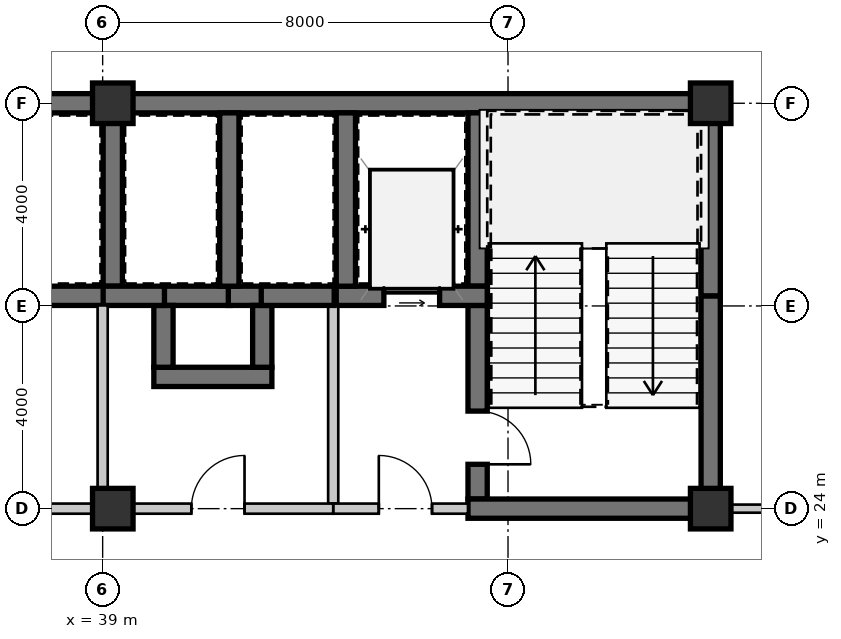
"""IFC4 building model, lengths in metres.
Left out: names, types, materials, properties, quantities, classifications, styles, units other than length and angle.
Written with IfcOpenShell. Run it as: python <this file> out.ifc"""

import sys

from ifc_helpers import new_model, si_unit, direction, frame, frame_2d, origin, origin_2d, place, context, subcontext, project, spatial, rectangle, extrude, source, transform, mapped, element, fill, save


model = new_model("IFC4")
c1 = context("Model", 3, precision=1e-05, world=origin(), true_north=direction((0.0, 1.0)))
c2 = subcontext(c1, "Body", "Model", "MODEL_VIEW")
j1 = project(units=[si_unit("LENGTHUNIT", "METRE"), si_unit("PLANEANGLEUNIT", "RADIAN")], contexts=[c1])
p1 = place(None, origin())
s1 = spatial("IfcSite", under=j1, at=p1, CompositionType="ELEMENT")
p2 = place(p1, origin())
s2 = spatial("IfcBuilding", under=s1, at=p2, CompositionType="ELEMENT")
p3 = place(p2, frame((0.0, 0.0, 19.95)))
s3 = spatial("IfcBuildingStorey", under=s2, at=p3, CompositionType="ELEMENT", Elevation=19.95)
m1 = source(origin(), c2, "Body", "SweptSolid", [
    extrude(rectangle(XDim=0.8, YDim=0.8, at=origin_2d()), origin(), (0.0, 0.0, 1.0), 3.15),
])
for number, where, z_axis, x_axis in (
    (1, (39.2, 24.0, 0.0), (0.0, 0.0, 1.0), (1.0, 0.0, 0.0)),
    (2, (51.0, 24.0, 0.0), (0.0, 0.0, 1.0), (1.0, 0.0, 0.0)),
    (3, (39.2, 32.0, 0.0), (0.0, 0.0, 1.0), (1.0, 0.0, 0.0)),
    (4, (51.0, 32.0, 0.0), (0.0, 0.0, 1.0), (1.0, 0.0, 0.0)),
):
    element("IfcColumn", number, at=place(p3, frame(where, z_axis=z_axis, x_axis=x_axis)), inside=s3, PredefinedType="COLUMN", context=c2, shape_type="MappedRepresentation", body=[
        mapped(m1, transform((0.0, 0.0, 0.0), scale=1.0)),
    ])
m2 = source(origin(), c2, "Body", "SweptSolid", [
    extrude(rectangle(XDim=11.2, YDim=0.38, at=frame_2d((5.6, 0.0))), origin(), (0.0, 0.0, 1.0), 2.93),
])
p4 = place(p3, frame((28.0, 32.0, 0.0), z_axis=(0.0, 0.0, 1.0), x_axis=(1.0, 0.0, 0.0)))
e5 = element("IfcWall", 5, at=p4, inside=s3, PredefinedType="SHEAR", context=c2, shape_type="MappedRepresentation", body=[
    mapped(m2, transform((0.0, 0.0, 0.0), scale=1.0)),
])
m3 = source(origin(), c2, "Body", "SweptSolid", [
    extrude(rectangle(XDim=11.99, YDim=0.38, at=frame_2d((5.995, 0.0))), origin(), (0.0, 0.0, 1.0), 2.93),
])
p5 = place(p3, frame((39.2, 32.0, 0.0), z_axis=(0.0, 0.0, 1.0), x_axis=(1.0, 0.0, 0.0)))
e6 = element("IfcWall", 6, at=p5, inside=s3, PredefinedType="SHEAR", context=c2, shape_type="MappedRepresentation", body=[
    mapped(m3, transform((0.0, 0.0, 0.0), scale=1.0)),
])
m4 = source(origin(), c2, "Body", "SweptSolid", [
    extrude(rectangle(XDim=4.01, YDim=0.38, at=frame_2d((2.005, 0.0))), origin(), (0.0, 0.0, 1.0), 2.93),
])
p6 = place(p3, frame((51.0, 24.19, 0.0), z_axis=(0.0, 0.0, 1.0), x_axis=(0.0, 1.0, 0.0)))
e7 = element("IfcWall", 7, at=p6, inside=s3, PredefinedType="SHEAR", context=c2, shape_type="MappedRepresentation", body=[
    mapped(m4, transform((0.0, 0.0, 0.0), scale=1.0)),
])
m5 = source(origin(), c2, "Body", "SweptSolid", [
    extrude(rectangle(XDim=3.61, YDim=0.38, at=frame_2d((1.805, 0.0))), origin(), (0.0, 0.0, 1.0), 2.93),
])
p7 = place(p3, frame((51.0, 28.2, 0.0), z_axis=(0.0, 0.0, 1.0), x_axis=(0.0, 1.0, 0.0)))
e8 = element("IfcWall", 8, at=p7, inside=s3, PredefinedType="SHEAR", context=c2, shape_type="MappedRepresentation", body=[
    mapped(m5, transform((0.0, 0.0, 0.0), scale=1.0)),
])
m6 = source(origin(), c2, "Body", "SweptSolid", [
    extrude(rectangle(XDim=3.42, YDim=0.38, at=frame_2d((1.71, 0.0))), origin(), (0.0, 0.0, 1.0), 2.93),
])
p8 = place(p3, frame((46.4, 31.81, 0.0), z_axis=(0.0, 0.0, 1.0), x_axis=(0.0, -1.0, 0.0)))
e9 = element("IfcWall", 9, at=p8, inside=s3, PredefinedType="SHEAR", context=c2, shape_type="MappedRepresentation", body=[
    mapped(m6, transform((0.0, 0.0, 0.0), scale=1.0)),
])
m7 = source(origin(), c2, "Body", "SweptSolid", [
    extrude(rectangle(XDim=3.82, YDim=0.38, at=frame_2d((1.91, 0.0))), origin(), (0.0, 0.0, 1.0), 2.93),
])
p9 = place(p3, frame((46.4, 28.01, 0.0), z_axis=(0.0, 0.0, 1.0), x_axis=(0.0, -1.0, 0.0)))
e10 = element("IfcWall", 10, at=p9, inside=s3, PredefinedType="SHEAR", context=c2, shape_type="MappedRepresentation", body=[
    mapped(m7, transform((0.0, 0.0, 0.0), scale=1.0)),
])
m8 = source(origin(), c2, "Body", "SweptSolid", [
    extrude(rectangle(XDim=1.05, YDim=2.1, at=frame_2d((0.525, 1.05))), frame((0.0, 0.2, 0.0), z_axis=(0.0, -1.0, 0.0), x_axis=(1.0, 0.0, 0.0)), (0.0, 0.0, 1.0), 0.4),
])
p10 = place(p9, frame((2.085, 0.0, 0.0)))
e11 = element("IfcOpeningElement", 11, at=p10, cuts=e10, PredefinedType="OPENING", context=c2, shape_type="MappedRepresentation", body=[
    mapped(m8, transform((0.0, 0.0, 0.0), scale=1.0)),
])
m9 = source(origin(), c2, "Body", "SweptSolid", [
    extrude(rectangle(XDim=4.98, YDim=0.38, at=frame_2d((2.49, 0.0))), origin(), (0.0, 0.0, 1.0), 2.93),
])
p11 = place(p3, frame((46.21, 24.0, 0.0), z_axis=(0.0, 0.0, 1.0), x_axis=(1.0, 0.0, 0.0)))
e12 = element("IfcWall", 12, at=p11, inside=s3, PredefinedType="SHEAR", context=c2, shape_type="MappedRepresentation", body=[
    mapped(m9, transform((0.0, 0.0, 0.0), scale=1.0)),
])
m10 = source(origin(), c2, "Body", "SweptSolid", [
    extrude(rectangle(XDim=2.98, YDim=0.38, at=frame_2d((1.49, 0.0))), origin(), (0.0, 0.0, 1.0), 2.93),
])
p12 = place(p3, frame((43.61, 28.2, 0.0), z_axis=(0.0, 0.0, 1.0), x_axis=(1.0, 0.0, 0.0)))
e13 = element("IfcWall", 13, at=p12, inside=s3, PredefinedType="SHEAR", context=c2, shape_type="MappedRepresentation", body=[
    mapped(m10, transform((0.0, 0.0, 0.0), scale=1.0)),
])
m11 = source(origin(), c2, "Body", "SweptSolid", [
    extrude(rectangle(XDim=1.1, YDim=2.15, at=frame_2d((0.55, 1.075))), frame((0.0, 0.2, 0.0), z_axis=(0.0, -1.0, 0.0), x_axis=(1.0, 0.0, 0.0)), (0.0, 0.0, 1.0), 0.4),
])
p13 = place(p12, frame((0.94, 0.0, 0.0)))
e14 = element("IfcOpeningElement", 14, at=p13, cuts=e13, PredefinedType="OPENING", context=c2, shape_type="MappedRepresentation", body=[
    mapped(m11, transform((0.0, 0.0, 0.0), scale=1.0)),
])
p14 = place(p3, frame((43.8, 31.81, 0.0), z_axis=(0.0, 0.0, 1.0), x_axis=(0.0, -1.0, 0.0)))
e15 = element("IfcWall", 15, at=p14, inside=s3, PredefinedType="SHEAR", context=c2, shape_type="MappedRepresentation", body=[
    mapped(m6, transform((0.0, 0.0, 0.0), scale=1.0)),
])
m12 = source(origin(), c2, "Body", "SweptSolid", [
    extrude(rectangle(XDim=3.91, YDim=0.2, at=frame_2d((1.955, 0.0))), origin(), (0.0, 0.0, 1.0), 2.93),
])
p15 = place(p3, frame((43.55, 28.01, 0.0), z_axis=(0.0, 0.0, 1.0), x_axis=(0.0, -1.0, 0.0)))
e16 = element("IfcWall", 16, at=p15, inside=s3, PredefinedType="SOLIDWALL", context=c2, shape_type="MappedRepresentation", body=[
    mapped(m12, transform((0.0, 0.0, 0.0), scale=1.0)),
])
m13 = source(origin(), c2, "Body", "SweptSolid", [
    extrude(rectangle(XDim=2.66, YDim=0.2, at=frame_2d((1.33, 0.0))), origin(), (0.0, 0.0, 1.0), 2.397),
])
p16 = place(p3, frame((43.55, 24.0, 0.0), z_axis=(0.0, 0.0, 1.0), x_axis=(1.0, 0.0, 0.0)))
e17 = element("IfcWall", 17, at=p16, inside=s3, PredefinedType="SOLIDWALL", context=c2, shape_type="MappedRepresentation", body=[
    mapped(m13, transform((0.0, 0.0, 0.0), scale=1.0)),
])
m14 = source(origin(), c2, "Body", "SweptSolid", [
    extrude(rectangle(XDim=1.05, YDim=2.1, at=frame_2d((0.525, 1.05))), frame((0.0, 0.11, 0.0), z_axis=(0.0, -1.0, 0.0), x_axis=(1.0, 0.0, 0.0)), (0.0, 0.0, 1.0), 0.22),
])
p17 = place(p16, frame((0.9, 0.0, 0.0)))
e18 = element("IfcOpeningElement", 18, at=p17, cuts=e17, PredefinedType="OPENING", context=c2, shape_type="MappedRepresentation", body=[
    mapped(m14, transform((0.0, 0.0, 0.0), scale=1.0)),
])
m15 = source(origin(), c2, "Body", "SweptSolid", [
    extrude(rectangle(XDim=1.32, YDim=0.38, at=frame_2d((0.66, 0.0))), origin(), (0.0, 0.0, 1.0), 2.93),
])
p18 = place(p3, frame((41.52, 28.2, 0.0), z_axis=(0.0, 0.0, 1.0), x_axis=(-1.0, 0.0, 0.0)))
e19 = element("IfcWall", 19, at=p18, inside=s3, PredefinedType="SHEAR", context=c2, shape_type="MappedRepresentation", body=[
    mapped(m15, transform((0.0, 0.0, 0.0), scale=1.0)),
])
m16 = source(origin(), c2, "Body", "SweptSolid", [
    extrude(rectangle(XDim=0.67, YDim=0.38, at=frame_2d((0.335, 0.0))), origin(), (0.0, 0.0, 1.0), 2.93),
])
p19 = place(p3, frame((42.15, 28.2, 0.0), z_axis=(0.0, 0.0, 1.0), x_axis=(-1.0, 0.0, 0.0)))
e20 = element("IfcWall", 20, at=p19, inside=s3, PredefinedType="SHEAR", context=c2, shape_type="MappedRepresentation", body=[
    mapped(m16, transform((0.0, 0.0, 0.0), scale=1.0)),
])
m17 = source(origin(), c2, "Body", "SweptSolid", [
    extrude(rectangle(XDim=2.33, YDim=0.38, at=frame_2d((1.165, 0.0))), origin(), (0.0, 0.0, 1.0), 2.93),
])
p20 = place(p3, frame((40.01, 26.6, 0.0), z_axis=(0.0, 0.0, 1.0), x_axis=(1.0, 0.0, 0.0)))
e21 = element("IfcWall", 21, at=p20, inside=s3, PredefinedType="SHEAR", context=c2, shape_type="MappedRepresentation", body=[
    mapped(m17, transform((0.0, 0.0, 0.0), scale=1.0)),
])
m18 = source(origin(), c2, "Body", "SweptSolid", [
    extrude(rectangle(XDim=1.22, YDim=0.38, at=frame_2d((0.61, 0.0))), origin(), (0.0, 0.0, 1.0), 2.93),
])
for number, where, z_axis, x_axis in (
    (22, (40.2, 28.01, 0.0), (0.0, 0.0, 1.0), (0.0, -1.0, 0.0)),
    (23, (42.15, 26.79, 0.0), (0.0, 0.0, 1.0), (0.0, 1.0, 0.0)),
):
    element("IfcWall", number, at=place(p3, frame(where, z_axis=z_axis, x_axis=x_axis)), inside=s3, PredefinedType="SHEAR", context=c2, shape_type="MappedRepresentation", body=[
        mapped(m18, transform((0.0, 0.0, 0.0), scale=1.0)),
    ])
p21 = place(p3, frame((39.2, 28.39, 0.0), z_axis=(0.0, 0.0, 1.0), x_axis=(0.0, 1.0, 0.0)))
e24 = element("IfcWall", 24, at=p21, inside=s3, PredefinedType="SHEAR", context=c2, shape_type="MappedRepresentation", body=[
    mapped(m6, transform((0.0, 0.0, 0.0), scale=1.0)),
])
m19 = source(origin(), c2, "Body", "SweptSolid", [
    extrude(rectangle(XDim=2.36, YDim=0.38, at=frame_2d((1.18, 0.0))), origin(), (0.0, 0.0, 1.0), 2.93),
])
p22 = place(p3, frame((36.66, 28.2, 0.0), z_axis=(0.0, 0.0, 1.0), x_axis=(1.0, 0.0, 0.0)))
e25 = element("IfcWall", 25, at=p22, inside=s3, PredefinedType="SHEAR", context=c2, shape_type="MappedRepresentation", body=[
    mapped(m19, transform((0.0, 0.0, 0.0), scale=1.0)),
])
p23 = place(p3, frame((41.5, 28.39, 0.0), z_axis=(0.0, 0.0, 1.0), x_axis=(0.0, 1.0, 0.0)))
e26 = element("IfcWall", 26, at=p23, inside=s3, PredefinedType="SHEAR", context=c2, shape_type="MappedRepresentation", body=[
    mapped(m6, transform((0.0, 0.0, 0.0), scale=1.0)),
])
m20 = source(origin(), c2, "Body", "SweptSolid", [
    extrude(rectangle(XDim=1.21, YDim=0.38, at=frame_2d((0.605, 0.0))), origin(), (0.0, 0.0, 1.0), 2.93),
])
p24 = place(p3, frame((39.01, 28.2, 0.0), z_axis=(0.0, 0.0, 1.0), x_axis=(1.0, 0.0, 0.0)))
e27 = element("IfcWall", 27, at=p24, inside=s3, PredefinedType="SHEAR", context=c2, shape_type="MappedRepresentation", body=[
    mapped(m20, transform((0.0, 0.0, 0.0), scale=1.0)),
])
m21 = source(origin(), c2, "Body", "SweptSolid", [
    extrude(rectangle(XDim=1.44, YDim=0.38, at=frame_2d((0.72, 0.0))), origin(), (0.0, 0.0, 1.0), 2.93),
])
p25 = place(p3, frame((42.13, 28.2, 0.0), z_axis=(0.0, 0.0, 1.0), x_axis=(1.0, 0.0, 0.0)))
e28 = element("IfcWall", 28, at=p25, inside=s3, PredefinedType="SHEAR", context=c2, shape_type="MappedRepresentation", body=[
    mapped(m21, transform((0.0, 0.0, 0.0), scale=1.0)),
])
p26 = place(p3, frame((39.0, 28.01, 0.0), z_axis=(0.0, 0.0, 1.0), x_axis=(0.0, -1.0, 0.0)))
e29 = element("IfcWall", 29, at=p26, inside=s3, PredefinedType="SOLIDWALL", context=c2, shape_type="MappedRepresentation", body=[
    mapped(m12, transform((0.0, 0.0, 0.0), scale=1.0)),
])
m22 = source(origin(), c2, "Body", "SweptSolid", [
    extrude(rectangle(XDim=3.85, YDim=0.2, at=frame_2d((1.925, 0.0))), origin(), (0.0, 0.0, 1.0), 2.47),
])
p27 = place(p3, frame((39.0, 24.0, 0.0), z_axis=(0.0, 0.0, 1.0), x_axis=(-1.0, 0.0, 0.0)))
e30 = element("IfcWall", 30, at=p27, inside=s3, PredefinedType="SOLIDWALL", context=c2, shape_type="MappedRepresentation", body=[
    mapped(m22, transform((0.0, 0.0, 0.0), scale=1.0)),
])
p28 = place(p27, frame((1.4, 0.0, 0.0)))
e31 = element("IfcOpeningElement", 31, at=p28, cuts=e30, PredefinedType="OPENING", context=c2, shape_type="MappedRepresentation", body=[
    mapped(m14, transform((0.0, 0.0, 0.0), scale=1.0)),
])
m23 = source(origin(), c2, "Body", "SweptSolid", [
    extrude(rectangle(XDim=4.55, YDim=0.2, at=frame_2d((2.275, 0.0))), origin(), (0.0, 0.0, 1.0), 2.397),
])
p29 = place(p3, frame((43.55, 24.0, 0.0), z_axis=(0.0, 0.0, 1.0), x_axis=(-1.0, 0.0, 0.0)))
e32 = element("IfcWall", 32, at=p29, inside=s3, PredefinedType="SOLIDWALL", context=c2, shape_type="MappedRepresentation", body=[
    mapped(m23, transform((0.0, 0.0, 0.0), scale=1.0)),
])
p30 = place(p29, frame((1.75, 0.0, 0.0)))
e33 = element("IfcOpeningElement", 33, at=p30, cuts=e32, PredefinedType="OPENING", context=c2, shape_type="MappedRepresentation", body=[
    mapped(m14, transform((0.0, 0.0, 0.0), scale=1.0)),
])
m24 = source(origin(), c2, "Body", "SweptSolid", [
    extrude(rectangle(XDim=4.13, YDim=0.16, at=frame_2d((2.065, 0.0))), origin(), (0.0, 0.0, 1.0), 2.93),
])
p31 = place(p3, frame((51.19, 24.0, 0.0), z_axis=(0.0, 0.0, 1.0), x_axis=(1.0, 0.0, 0.0)))
e34 = element("IfcWall", 34, at=p31, inside=s3, PredefinedType="PARTITIONING", context=c2, shape_type="MappedRepresentation", body=[
    mapped(m24, transform((0.0, 0.0, 0.0), scale=1.0)),
])
m25 = source(origin(), c2, "Body", "SweptSolid", [
    extrude(rectangle(XDim=1.05, YDim=2.1, at=frame_2d((0.525, 1.05))), frame((0.0, 0.025, 0.0), z_axis=(0.0, -1.0, 0.0), x_axis=(1.0, 0.0, 0.0)), (0.0, 0.0, 1.0), 0.05),
])
p32 = place(p10, origin())
e35 = element("IfcDoor", 35, at=p32, inside=s3, OperationType="SINGLE_SWING_RIGHT", PredefinedType="DOOR", context=c2, shape_type="MappedRepresentation", body=[
    mapped(m25, transform((0.0, 0.0, 0.0), scale=1.0)),
])
fill(e11, e35)
m26 = source(origin(), c2, "Body", "SweptSolid", [
    extrude(rectangle(XDim=1.1, YDim=2.15, at=frame_2d((0.55, 1.075))), frame((0.0, 0.025, 0.0), z_axis=(0.0, -1.0, 0.0), x_axis=(1.0, 0.0, 0.0)), (0.0, 0.0, 1.0), 0.05),
])
p33 = place(p13, origin())
e36 = element("IfcDoor", 36, at=p33, inside=s3, OperationType="SLIDING_TO_LEFT", PredefinedType="DOOR", context=c2, shape_type="MappedRepresentation", body=[
    mapped(m26, transform((0.0, 0.0, 0.0), scale=1.0)),
])
fill(e14, e36)
p34 = place(p17, origin())
e37 = element("IfcDoor", 37, at=p34, inside=s3, OperationType="SINGLE_SWING_LEFT", PredefinedType="DOOR", context=c2, shape_type="MappedRepresentation", body=[
    mapped(m25, transform((0.0, 0.0, 0.0), scale=1.0)),
])
fill(e18, e37)
p35 = place(p30, frame((1.05, 0.0, 0.0), z_axis=(0.0, 0.0, 1.0), x_axis=(-1.0, 0.0, 0.0)))
e38 = element("IfcDoor", 38, at=p35, inside=s3, OperationType="SINGLE_SWING_RIGHT", PredefinedType="DOOR", context=c2, shape_type="MappedRepresentation", body=[
    mapped(m25, transform((0.0, 0.0, 0.0), scale=1.0)),
])
fill(e33, e38)
save(model, sys.argv[1])
